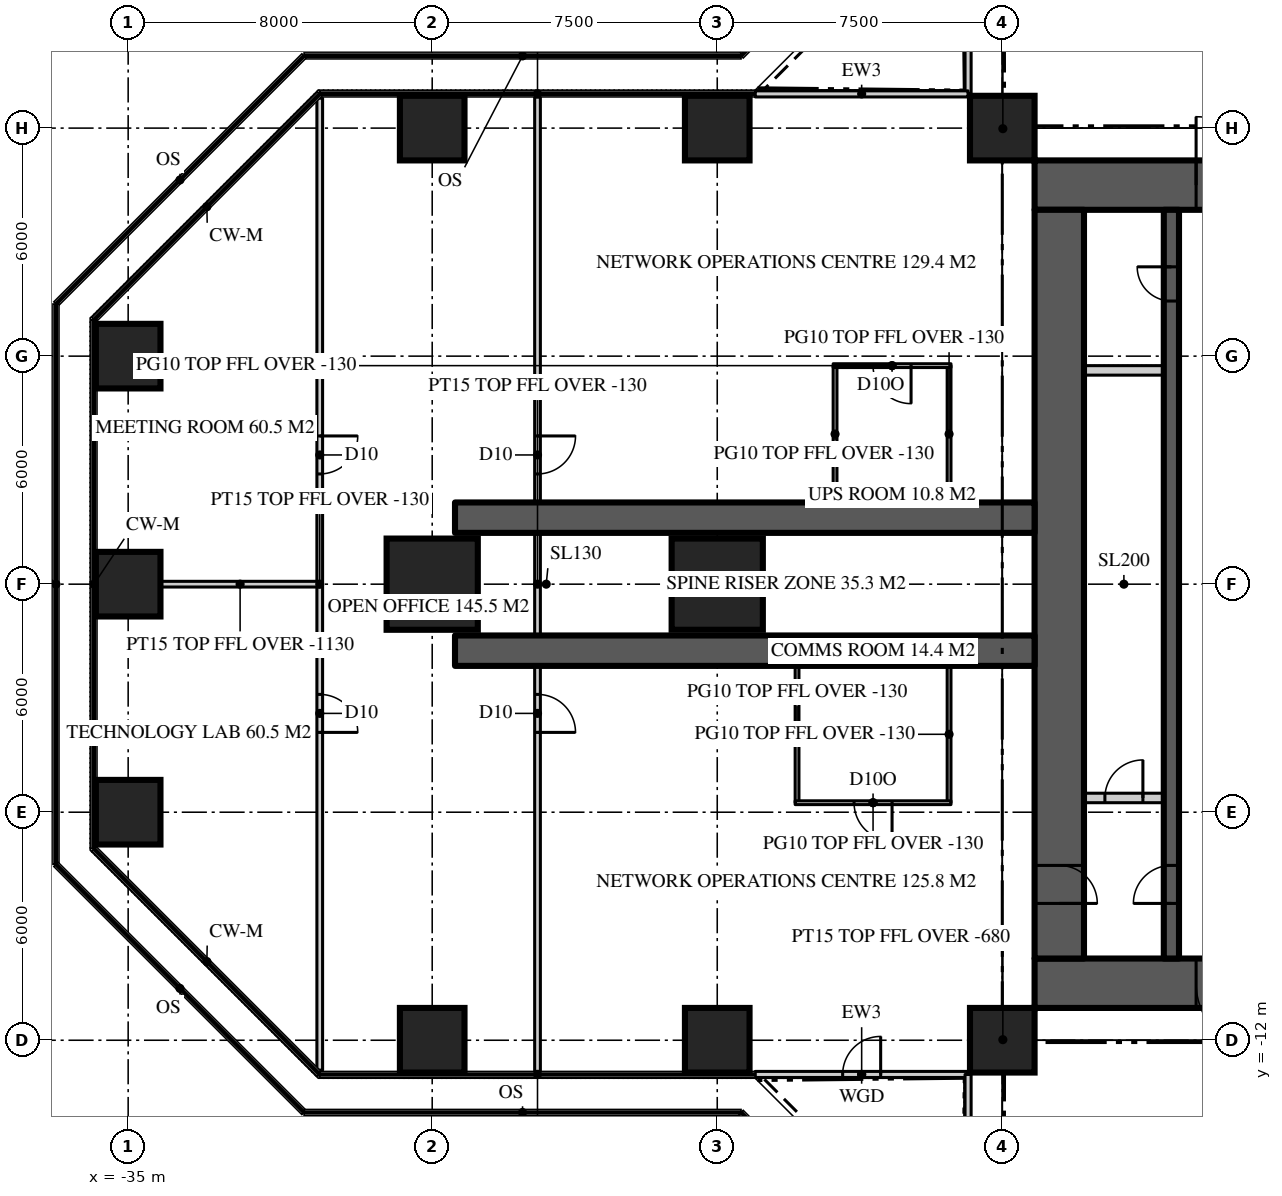
"""IFC4 building model, lengths in metres.
Left out: names, types, materials, properties, quantities, classifications, styles, units other than length and angle.
Written with IfcOpenShell. Run it as: python <this file> out.ifc"""

import sys

from ifc_helpers import new_model, si_unit, direction, frame, frame_2d, origin, origin_2d, place, context, subcontext, project, spatial, rectangle, extrude, element, fill, save


model = new_model("IFC4")
c1 = context("Model", 3, precision=1e-05, world=origin(), true_north=direction((0.0, 1.0)))
c2 = subcontext(c1, "Body", "Model", "MODEL_VIEW")
j1 = project(units=[si_unit("LENGTHUNIT", "METRE"), si_unit("PLANEANGLEUNIT", "RADIAN")], contexts=[c1])
p1 = place(None, origin())
s1 = spatial("IfcSite", under=j1, at=p1, CompositionType="ELEMENT")
p2 = place(p1, origin())
s2 = spatial("IfcBuilding", under=s1, at=p2, CompositionType="ELEMENT")
p3 = place(p2, frame((0.0, 0.0, 147.6)))
s3 = spatial("IfcBuildingStorey", under=s2, at=p3, CompositionType="ELEMENT", Elevation=147.6)
p4 = place(p3, frame((-11.15, 10.5, 0.0), z_axis=(0.0, 0.0, 1.0), x_axis=(1.0, 0.0, 0.0)))
e1 = element("IfcWall", 1, at=p4, inside=s3, PredefinedType="SHEAR", context=c2, shape_type="SweptSolid", body=[
    extrude(rectangle(XDim=22.3, YDim=1.3, at=frame_2d((11.15, 0.0))), origin(), (0.0, 0.0, 1.0), 3.9),
])
p5 = place(p4, frame((4.25, 0.0, 0.0)))
e2 = element("IfcOpeningElement", 2, at=p5, cuts=e1, PredefinedType="OPENING", context=c2, shape_type="SweptSolid", body=[
    extrude(rectangle(XDim=1.8, YDim=2.2, at=frame_2d((0.9, 1.1))), frame((0.0, 0.66, 0.0), z_axis=(0.0, -1.0, 0.0), x_axis=(1.0, 0.0, 0.0)), (0.0, 0.0, 1.0), 1.32),
])
p6 = place(p4, frame((16.25, 0.0, 0.0)))
e3 = element("IfcOpeningElement", 3, at=p6, cuts=e1, PredefinedType="OPENING", context=c2, shape_type="SweptSolid", body=[
    extrude(rectangle(XDim=1.8, YDim=2.2, at=frame_2d((0.9, 1.1))), frame((0.0, 0.66, 0.0), z_axis=(0.0, -1.0, 0.0), x_axis=(1.0, 0.0, 0.0)), (0.0, 0.0, 1.0), 1.32),
])
p7 = place(p3, frame((11.15, -10.5, 0.0), z_axis=(0.0, 0.0, 1.0), x_axis=(-1.0, 0.0, 0.0)))
e4 = element("IfcWall", 4, at=p7, inside=s3, PredefinedType="SHEAR", context=c2, shape_type="SweptSolid", body=[
    extrude(rectangle(XDim=22.3, YDim=1.3, at=frame_2d((11.15, 0.0))), origin(), (0.0, 0.0, 1.0), 3.9),
])
p8 = place(p7, frame((16.25, 0.0, 0.0)))
e5 = element("IfcOpeningElement", 5, at=p8, cuts=e4, PredefinedType="OPENING", context=c2, shape_type="SweptSolid", body=[
    extrude(rectangle(XDim=1.8, YDim=2.2, at=frame_2d((0.9, 1.1))), frame((0.0, 0.66, 0.0), z_axis=(0.0, -1.0, 0.0), x_axis=(1.0, 0.0, 0.0)), (0.0, 0.0, 1.0), 1.32),
])
p9 = place(p7, frame((4.25, 0.0, 0.0)))
e6 = element("IfcOpeningElement", 6, at=p9, cuts=e4, PredefinedType="OPENING", context=c2, shape_type="SweptSolid", body=[
    extrude(rectangle(XDim=1.8, YDim=2.2, at=frame_2d((0.9, 1.1))), frame((0.0, 0.66, 0.0), z_axis=(0.0, -1.0, 0.0), x_axis=(1.0, 0.0, 0.0)), (0.0, 0.0, 1.0), 1.32),
])
p10 = place(p3, frame((-10.5, 9.85, 0.0), z_axis=(0.0, 0.0, 1.0), x_axis=(0.0, -1.0, 0.0)))
e7 = element("IfcWall", 7, at=p10, inside=s3, PredefinedType="SHEAR", context=c2, shape_type="SweptSolid", body=[
    extrude(rectangle(XDim=19.7, YDim=1.3, at=frame_2d((9.85, 0.0))), origin(), (0.0, 0.0, 1.0), 3.9),
])
p11 = place(p10, frame((17.25, 0.0, 0.0)))
e8 = element("IfcOpeningElement", 8, at=p11, cuts=e7, PredefinedType="OPENING", context=c2, shape_type="SweptSolid", body=[
    extrude(rectangle(XDim=1.0, YDim=2.2, at=frame_2d((0.5, 1.1))), frame((0.0, 0.66, 0.0), z_axis=(0.0, -1.0, 0.0), x_axis=(1.0, 0.0, 0.0)), (0.0, 0.0, 1.0), 1.32),
])
for number, where, z_axis, x_axis in (
    (9, (-11.15, 1.75, 0.0), (0.0, 0.0, 1.0), (-1.0, 0.0, 0.0)),
    (10, (-11.15, -1.75, 0.0), (0.0, 0.0, 1.0), (-1.0, 0.0, 0.0)),
):
    element("IfcWall", number, at=place(p3, frame(where, z_axis=z_axis, x_axis=x_axis)), inside=s3, PredefinedType="SHEAR", context=c2, shape_type="SweptSolid", body=[
        extrude(rectangle(XDim=15.25, YDim=0.8, at=frame_2d((7.625, 0.0))), origin(), (0.0, 0.0, 1.0), 3.9),
    ])
for number, where, z_axis, x_axis in (
    (11, (-27.0, -12.0, 0.0), (0.0, 0.0, 1.0), (1.0, 0.0, 0.0)),
    (12, (-19.5, -12.0, 0.0), (0.0, 0.0, 1.0), (1.0, 0.0, 0.0)),
    (13, (-12.0, -12.0, 0.0), (0.0, 0.0, 1.0), (1.0, 0.0, 0.0)),
    (14, (-35.0, -6.0, 0.0), (0.0, 0.0, 1.0), (1.0, 0.0, 0.0)),
    (15, (-35.0, 0.0, 0.0), (0.0, 0.0, 1.0), (1.0, 0.0, 0.0)),
):
    element("IfcColumn", number, at=place(p3, frame(where, z_axis=z_axis, x_axis=x_axis)), inside=s3, PredefinedType="COLUMN", context=c2, shape_type="SweptSolid", body=[
        extrude(rectangle(XDim=1.7, YDim=1.7, at=origin_2d()), origin(), (0.0, 0.0, 1.0), 3.9),
    ])
for number, where, z_axis, x_axis in (
    (16, (-27.0, 0.0, 0.0), (0.0, 0.0, 1.0), (1.0, 0.0, 0.0)),
    (17, (-19.5, 0.0, 0.0), (0.0, 0.0, 1.0), (1.0, 0.0, 0.0)),
):
    element("IfcColumn", number, at=place(p3, frame(where, z_axis=z_axis, x_axis=x_axis)), inside=s3, PredefinedType="COLUMN", context=c2, shape_type="SweptSolid", body=[
        extrude(rectangle(XDim=2.4, YDim=2.4, at=origin_2d()), origin(), (0.0, 0.0, 1.0), 3.9),
    ])
for number, where, z_axis, x_axis in (
    (18, (-35.0, 6.0, 0.0), (0.0, 0.0, 1.0), (1.0, 0.0, 0.0)),
    (19, (-27.0, 12.0, 0.0), (0.0, 0.0, 1.0), (1.0, 0.0, 0.0)),
    (20, (-19.5, 12.0, 0.0), (0.0, 0.0, 1.0), (1.0, 0.0, 0.0)),
    (21, (-12.0, 12.0, 0.0), (0.0, 0.0, 1.0), (1.0, 0.0, 0.0)),
):
    element("IfcColumn", number, at=place(p3, frame(where, z_axis=z_axis, x_axis=x_axis)), inside=s3, PredefinedType="COLUMN", context=c2, shape_type="SweptSolid", body=[
        extrude(rectangle(XDim=1.7, YDim=1.7, at=origin_2d()), origin(), (0.0, 0.0, 1.0), 3.9),
    ])
p12 = place(p3, frame((-12.9, 18.5, 0.0), z_axis=(0.0, 0.0, 1.0), x_axis=(0.0, -1.0, 0.0)))
e22 = element("IfcWall", 22, at=p12, inside=s3, PredefinedType="SOLIDWALL", context=c2, shape_type="SweptSolid", body=[
    extrude(rectangle(XDim=5.6, YDim=0.16, at=frame_2d((2.8, 0.0))), origin(), (0.0, 0.0, 1.0), 3.77),
])
p13 = place(p12, frame((2.3, 0.0, 0.0)))
e23 = element("IfcOpeningElement", 23, at=p13, cuts=e22, PredefinedType="OPENING", context=c2, shape_type="SweptSolid", body=[
    extrude(rectangle(XDim=1.0, YDim=2.2, at=frame_2d((0.5, 1.1))), frame((0.0, 0.09, 0.0), z_axis=(0.0, -1.0, 0.0), x_axis=(1.0, 0.0, 0.0)), (0.0, 0.0, 1.0), 0.18),
])
p14 = place(p3, frame((-12.9, 12.9, 0.0), z_axis=(0.0, 0.0, 1.0), x_axis=(-1.0, 0.0, 0.0)))
e24 = element("IfcWall", 24, at=p14, inside=s3, PredefinedType="SOLIDWALL", context=c2, shape_type="SweptSolid", body=[
    extrude(rectangle(XDim=5.6, YDim=0.16, at=frame_2d((2.8, 0.0))), origin(), (0.0, 0.0, 1.0), 3.77),
])
p15 = place(p3, frame((-18.5, -12.9, 0.0), z_axis=(0.0, 0.0, 1.0), x_axis=(1.0, 0.0, 0.0)))
e25 = element("IfcWall", 25, at=p15, inside=s3, PredefinedType="SOLIDWALL", context=c2, shape_type="SweptSolid", body=[
    extrude(rectangle(XDim=5.6, YDim=0.16, at=frame_2d((2.8, 0.0))), origin(), (0.0, 0.0, 1.0), 3.77),
])
p16 = place(p15, frame((2.3, 0.0, 0.0)))
e26 = element("IfcOpeningElement", 26, at=p16, cuts=e25, PredefinedType="OPENING", context=c2, shape_type="SweptSolid", body=[
    extrude(rectangle(XDim=1.0, YDim=2.2, at=frame_2d((0.5, 1.1))), frame((0.0, 0.09, 0.0), z_axis=(0.0, -1.0, 0.0), x_axis=(1.0, 0.0, 0.0)), (0.0, 0.0, 1.0), 0.18),
])
p17 = place(p3, frame((-12.9, -12.9, 0.0), z_axis=(0.0, 0.0, 1.0), x_axis=(0.0, -1.0, 0.0)))
e27 = element("IfcWall", 27, at=p17, inside=s3, PredefinedType="SOLIDWALL", context=c2, shape_type="SweptSolid", body=[
    extrude(rectangle(XDim=5.6, YDim=0.16, at=frame_2d((2.8, 0.0))), origin(), (0.0, 0.0, 1.0), 3.77),
])
p18 = place(p3, frame((-7.55, -9.85, 0.0), z_axis=(0.0, 0.0, 1.0), x_axis=(0.0, 1.0, 0.0)))
e28 = element("IfcWall", 28, at=p18, inside=s3, PredefinedType="SHEAR", context=c2, shape_type="SweptSolid", body=[
    extrude(rectangle(XDim=19.7, YDim=0.4, at=frame_2d((9.85, 0.0))), origin(), (0.0, 0.0, 1.0), 3.9),
])
p19 = place(p18, frame((1.45, 0.0, 0.0)))
e29 = element("IfcOpeningElement", 29, at=p19, cuts=e28, PredefinedType="OPENING", context=c2, shape_type="SweptSolid", body=[
    extrude(rectangle(XDim=1.0, YDim=2.2, at=frame_2d((0.5, 1.1))), frame((0.0, 0.21, 0.0), z_axis=(0.0, -1.0, 0.0), x_axis=(1.0, 0.0, 0.0)), (0.0, 0.0, 1.0), 0.42),
])
p20 = place(p18, frame((17.3, 0.0, 0.0)))
e30 = element("IfcOpeningElement", 30, at=p20, cuts=e28, PredefinedType="OPENING", context=c2, shape_type="SweptSolid", body=[
    extrude(rectangle(XDim=0.9, YDim=2.1, at=frame_2d((0.45, 1.05))), frame((0.0, 0.21, 0.0), z_axis=(0.0, -1.0, 0.0), x_axis=(1.0, 0.0, 0.0)), (0.0, 0.0, 1.0), 0.42),
])
p21 = place(p3, frame((-9.85, 5.625, 0.0), z_axis=(0.0, 0.0, 1.0), x_axis=(1.0, 0.0, 0.0)))
e31 = element("IfcWall", 31, at=p21, inside=s3, PredefinedType="SOLIDWALL", context=c2, shape_type="SweptSolid", body=[
    extrude(rectangle(XDim=2.1, YDim=0.25, at=frame_2d((1.05, 0.0))), origin(), (0.0, 0.0, 1.0), 3.7),
])
p22 = place(p3, frame((-9.85, -5.625, 0.0), z_axis=(0.0, 0.0, 1.0), x_axis=(1.0, 0.0, 0.0)))
e32 = element("IfcWall", 32, at=p22, inside=s3, PredefinedType="SOLIDWALL", context=c2, shape_type="SweptSolid", body=[
    extrude(rectangle(XDim=2.1, YDim=0.25, at=frame_2d((1.05, 0.0))), origin(), (0.0, 0.0, 1.0), 3.7),
])
p23 = place(p22, frame((0.55, 0.0, 0.0)))
e33 = element("IfcOpeningElement", 33, at=p23, cuts=e32, PredefinedType="OPENING", context=c2, shape_type="SweptSolid", body=[
    extrude(rectangle(XDim=1.0, YDim=2.2, at=frame_2d((0.5, 1.1))), frame((0.0, 0.135, 0.0), z_axis=(0.0, -1.0, 0.0), x_axis=(1.0, 0.0, 0.0)), (0.0, 0.0, 1.0), 0.27),
])
p24 = place(p3, frame((-24.229, 12.82, 0.0), z_axis=(0.0, 0.0, 1.0), x_axis=(0.0, -1.0, 0.0)))
e34 = element("IfcWall", 34, at=p24, inside=s3, PredefinedType="PARTITIONING", context=c2, shape_type="SweptSolid", body=[
    extrude(rectangle(XDim=25.64, YDim=0.15, at=frame_2d((12.82, 0.0))), origin(), (0.0, 0.0, 1.0), 3.77),
])
p25 = place(p24, frame((15.72, 0.0, 0.0)))
e35 = element("IfcOpeningElement", 35, at=p25, cuts=e34, PredefinedType="OPENING", context=c2, shape_type="SweptSolid", body=[
    extrude(rectangle(XDim=1.0, YDim=2.2, at=frame_2d((0.5, 1.1))), frame((0.0, 0.085, 0.0), z_axis=(0.0, -1.0, 0.0), x_axis=(1.0, 0.0, 0.0)), (0.0, 0.0, 1.0), 0.17),
])
p26 = place(p24, frame((8.92, 0.0, 0.0)))
e36 = element("IfcOpeningElement", 36, at=p26, cuts=e34, PredefinedType="OPENING", context=c2, shape_type="SweptSolid", body=[
    extrude(rectangle(XDim=1.0, YDim=2.2, at=frame_2d((0.5, 1.1))), frame((0.0, 0.085, 0.0), z_axis=(0.0, -1.0, 0.0), x_axis=(1.0, 0.0, 0.0)), (0.0, 0.0, 1.0), 0.17),
])
p27 = place(p3, frame((-29.959, 12.786, 0.0), z_axis=(0.0, 0.0, 1.0), x_axis=(0.0, -1.0, 0.0)))
e37 = element("IfcWall", 37, at=p27, inside=s3, PredefinedType="PARTITIONING", context=c2, shape_type="SweptSolid", body=[
    extrude(rectangle(XDim=25.573, YDim=0.15, at=frame_2d((12.786, 0.0))), origin(), (0.0, 0.0, 1.0), 3.77),
])
p28 = place(p27, frame((15.687, 0.0, 0.0)))
e38 = element("IfcOpeningElement", 38, at=p28, cuts=e37, PredefinedType="OPENING", context=c2, shape_type="SweptSolid", body=[
    extrude(rectangle(XDim=1.0, YDim=2.2, at=frame_2d((0.5, 1.1))), frame((0.0, 0.085, 0.0), z_axis=(0.0, -1.0, 0.0), x_axis=(1.0, 0.0, 0.0)), (0.0, 0.0, 1.0), 0.17),
])
p29 = place(p27, frame((8.886, 0.0, 0.0)))
e39 = element("IfcOpeningElement", 39, at=p29, cuts=e37, PredefinedType="OPENING", context=c2, shape_type="SweptSolid", body=[
    extrude(rectangle(XDim=1.0, YDim=2.2, at=frame_2d((0.5, 1.1))), frame((0.0, 0.085, 0.0), z_axis=(0.0, -1.0, 0.0), x_axis=(1.0, 0.0, 0.0)), (0.0, 0.0, 1.0), 0.17),
])
p30 = place(p3, frame((-29.959, 0.0, 0.0), z_axis=(0.0, 0.0, 1.0), x_axis=(-1.0, 0.0, 0.0)))
e40 = element("IfcWall", 40, at=p30, inside=s3, PredefinedType="PARTITIONING", context=c2, shape_type="SweptSolid", body=[
    extrude(rectangle(XDim=4.191, YDim=0.15, at=frame_2d((2.095, 0.0))), origin(), (0.0, 0.0, 1.0), 2.77),
])
for number, where, z_axis, x_axis in (
    (41, (-13.4, -2.15, 0.0), (0.0, 0.0, 1.0), (0.0, -1.0, 0.0)),
    (42, (-17.4, -2.15, 0.0), (0.0, 0.0, 1.0), (0.0, -1.0, 0.0)),
):
    element("IfcWall", number, at=place(p3, frame(where, z_axis=z_axis, x_axis=x_axis)), inside=s3, PredefinedType="PARTITIONING", context=c2, shape_type="SweptSolid", body=[
        extrude(rectangle(XDim=3.6, YDim=0.1, at=frame_2d((1.8, 0.0))), origin(), (0.0, 0.0, 1.0), 3.77),
    ])
p31 = place(p3, frame((-13.35, -5.75, 0.0), z_axis=(0.0, 0.0, 1.0), x_axis=(-1.0, 0.0, 0.0)))
e43 = element("IfcWall", 43, at=p31, inside=s3, PredefinedType="PARTITIONING", context=c2, shape_type="SweptSolid", body=[
    extrude(rectangle(XDim=4.1, YDim=0.1, at=frame_2d((2.05, 0.0))), origin(), (0.0, 0.0, 1.0), 3.77),
])
p32 = place(p31, frame((1.55, 0.0, 0.0)))
e44 = element("IfcOpeningElement", 44, at=p32, cuts=e43, PredefinedType="OPENING", context=c2, shape_type="SweptSolid", body=[
    extrude(rectangle(XDim=1.0, YDim=2.2, at=frame_2d((0.5, 1.1))), frame((0.0, 0.06, 0.0), z_axis=(0.0, -1.0, 0.0), x_axis=(1.0, 0.0, 0.0)), (0.0, 0.0, 1.0), 0.12),
])
for number, where, z_axis, x_axis in (
    (45, (-13.4, 2.15, 0.0), (0.0, 0.0, 1.0), (0.0, 1.0, 0.0)),
    (46, (-16.4, 2.15, 0.0), (0.0, 0.0, 1.0), (0.0, 1.0, 0.0)),
):
    element("IfcWall", number, at=place(p3, frame(where, z_axis=z_axis, x_axis=x_axis)), inside=s3, PredefinedType="PARTITIONING", context=c2, shape_type="SweptSolid", body=[
        extrude(rectangle(XDim=3.6, YDim=0.1, at=frame_2d((1.8, 0.0))), origin(), (0.0, 0.0, 1.0), 3.77),
    ])
p33 = place(p3, frame((-13.35, 5.75, 0.0), z_axis=(0.0, 0.0, 1.0), x_axis=(-1.0, 0.0, 0.0)))
e47 = element("IfcWall", 47, at=p33, inside=s3, PredefinedType="PARTITIONING", context=c2, shape_type="SweptSolid", body=[
    extrude(rectangle(XDim=3.1, YDim=0.1, at=frame_2d((1.55, 0.0))), origin(), (0.0, 0.0, 1.0), 3.77),
])
p34 = place(p33, frame((1.05, 0.0, 0.0)))
e48 = element("IfcOpeningElement", 48, at=p34, cuts=e47, PredefinedType="OPENING", context=c2, shape_type="SweptSolid", body=[
    extrude(rectangle(XDim=1.0, YDim=2.2, at=frame_2d((0.5, 1.1))), frame((0.0, 0.06, 0.0), z_axis=(0.0, -1.0, 0.0), x_axis=(1.0, 0.0, 0.0)), (0.0, 0.0, 1.0), 0.12),
])
for number, where, z_axis, x_axis in (
    (49, (-11.15, 11.15, 0.0), (0.0, 0.0, 1.0), (-0.707, 0.707, 0.0)),
    (50, (-11.15, -11.15, 0.0), (0.0, 0.0, 1.0), (-0.707, -0.707, 0.0)),
):
    element("IfcWall", number, at=place(p3, frame(where, z_axis=z_axis, x_axis=x_axis)), inside=s3, PredefinedType="PARTITIONING", context=c2, shape_type="SweptSolid", body=[
        extrude(rectangle(XDim=2.362, YDim=0.15, at=frame_2d((1.181, 0.0))), origin(), (0.0, 0.0, 1.0), 3.22),
    ])
p35 = place(p16, origin())
e51 = element("IfcDoor", 51, at=p35, inside=s3, OperationType="SINGLE_SWING_RIGHT", PredefinedType="DOOR", context=c2, shape_type="SweptSolid", body=[
    extrude(rectangle(XDim=1.0, YDim=2.2, at=frame_2d((0.5, 1.1))), frame((0.0, 0.025, 0.0), z_axis=(0.0, -1.0, 0.0), x_axis=(1.0, 0.0, 0.0)), (0.0, 0.0, 1.0), 0.05),
])
fill(e26, e51)
p36 = place(p5, origin())
e52 = element("IfcDoor", 52, at=p36, inside=s3, OperationType="DOUBLE_DOOR_DOUBLE_SWING", PredefinedType="DOOR", context=c2, shape_type="SweptSolid", body=[
    extrude(rectangle(XDim=1.8, YDim=2.2, at=frame_2d((0.9, 1.1))), frame((0.0, 0.025, 0.0), z_axis=(0.0, -1.0, 0.0), x_axis=(1.0, 0.0, 0.0)), (0.0, 0.0, 1.0), 0.05),
])
fill(e2, e52)
p37 = place(p8, origin())
e53 = element("IfcDoor", 53, at=p37, inside=s3, OperationType="DOUBLE_DOOR_DOUBLE_SWING", PredefinedType="DOOR", context=c2, shape_type="SweptSolid", body=[
    extrude(rectangle(XDim=1.8, YDim=2.2, at=frame_2d((0.9, 1.1))), frame((0.0, 0.025, 0.0), z_axis=(0.0, -1.0, 0.0), x_axis=(1.0, 0.0, 0.0)), (0.0, 0.0, 1.0), 0.05),
])
fill(e5, e53)
p38 = place(p19, origin())
e54 = element("IfcDoor", 54, at=p38, inside=s3, OperationType="SINGLE_SWING_LEFT", PredefinedType="DOOR", context=c2, shape_type="SweptSolid", body=[
    extrude(rectangle(XDim=1.0, YDim=2.2, at=frame_2d((0.5, 1.1))), frame((0.0, 0.025, 0.0), z_axis=(0.0, -1.0, 0.0), x_axis=(1.0, 0.0, 0.0)), (0.0, 0.0, 1.0), 0.05),
])
fill(e29, e54)
p39 = place(p11, origin())
e55 = element("IfcDoor", 55, at=p39, inside=s3, OperationType="SINGLE_SWING_RIGHT", PredefinedType="DOOR", context=c2, shape_type="SweptSolid", body=[
    extrude(rectangle(XDim=1.0, YDim=2.2, at=frame_2d((0.5, 1.1))), frame((0.0, 0.025, 0.0), z_axis=(0.0, -1.0, 0.0), x_axis=(1.0, 0.0, 0.0)), (0.0, 0.0, 1.0), 0.05),
])
fill(e8, e55)
p40 = place(p20, origin())
e56 = element("IfcDoor", 56, at=p40, inside=s3, OperationType="SINGLE_SWING_RIGHT", PredefinedType="DOOR", context=c2, shape_type="SweptSolid", body=[
    extrude(rectangle(XDim=0.9, YDim=2.1, at=frame_2d((0.45, 1.05))), frame((0.0, 0.025, 0.0), z_axis=(0.0, -1.0, 0.0), x_axis=(1.0, 0.0, 0.0)), (0.0, 0.0, 1.0), 0.05),
])
fill(e30, e56)
p41 = place(p25, origin())
e57 = element("IfcDoor", 57, at=p41, inside=s3, OperationType="SINGLE_SWING_RIGHT", PredefinedType="DOOR", context=c2, shape_type="SweptSolid", body=[
    extrude(rectangle(XDim=1.0, YDim=2.2, at=frame_2d((0.5, 1.1))), frame((0.0, 0.025, 0.0), z_axis=(0.0, -1.0, 0.0), x_axis=(1.0, 0.0, 0.0)), (0.0, 0.0, 1.0), 0.05),
])
fill(e35, e57)
p42 = place(p26, origin())
e58 = element("IfcDoor", 58, at=p42, inside=s3, OperationType="SINGLE_SWING_LEFT", PredefinedType="DOOR", context=c2, shape_type="SweptSolid", body=[
    extrude(rectangle(XDim=1.0, YDim=2.2, at=frame_2d((0.5, 1.1))), frame((0.0, 0.025, 0.0), z_axis=(0.0, -1.0, 0.0), x_axis=(1.0, 0.0, 0.0)), (0.0, 0.0, 1.0), 0.05),
])
fill(e36, e58)
p43 = place(p28, origin())
e59 = element("IfcDoor", 59, at=p43, inside=s3, OperationType="SINGLE_SWING_RIGHT", PredefinedType="DOOR", context=c2, shape_type="SweptSolid", body=[
    extrude(rectangle(XDim=1.0, YDim=2.2, at=frame_2d((0.5, 1.1))), frame((0.0, 0.025, 0.0), z_axis=(0.0, -1.0, 0.0), x_axis=(1.0, 0.0, 0.0)), (0.0, 0.0, 1.0), 0.05),
])
fill(e38, e59)
p44 = place(p29, origin())
e60 = element("IfcDoor", 60, at=p44, inside=s3, OperationType="SINGLE_SWING_LEFT", PredefinedType="DOOR", context=c2, shape_type="SweptSolid", body=[
    extrude(rectangle(XDim=1.0, YDim=2.2, at=frame_2d((0.5, 1.1))), frame((0.0, 0.025, 0.0), z_axis=(0.0, -1.0, 0.0), x_axis=(1.0, 0.0, 0.0)), (0.0, 0.0, 1.0), 0.05),
])
fill(e39, e60)
p45 = place(p32, origin())
e61 = element("IfcDoor", 61, at=p45, inside=s3, OperationType="SINGLE_SWING_LEFT", PredefinedType="DOOR", context=c2, shape_type="SweptSolid", body=[
    extrude(rectangle(XDim=1.0, YDim=2.2, at=frame_2d((0.5, 1.1))), frame((0.0, 0.025, 0.0), z_axis=(0.0, -1.0, 0.0), x_axis=(1.0, 0.0, 0.0)), (0.0, 0.0, 1.0), 0.05),
])
fill(e44, e61)
p46 = place(p34, origin())
e62 = element("IfcDoor", 62, at=p46, inside=s3, OperationType="SINGLE_SWING_LEFT", PredefinedType="DOOR", context=c2, shape_type="SweptSolid", body=[
    extrude(rectangle(XDim=1.0, YDim=2.2, at=frame_2d((0.5, 1.1))), frame((0.0, 0.025, 0.0), z_axis=(0.0, -1.0, 0.0), x_axis=(1.0, 0.0, 0.0)), (0.0, 0.0, 1.0), 0.05),
])
fill(e48, e62)
p47 = place(p23, origin())
e63 = element("IfcDoor", 63, at=p47, inside=s3, OperationType="SINGLE_SWING_RIGHT", PredefinedType="DOOR", context=c2, shape_type="SweptSolid", body=[
    extrude(rectangle(XDim=1.0, YDim=2.2, at=frame_2d((0.5, 1.1))), frame((0.0, 0.025, 0.0), z_axis=(0.0, -1.0, 0.0), x_axis=(1.0, 0.0, 0.0)), (0.0, 0.0, 1.0), 0.05),
])
fill(e33, e63)
save(model, sys.argv[1])
